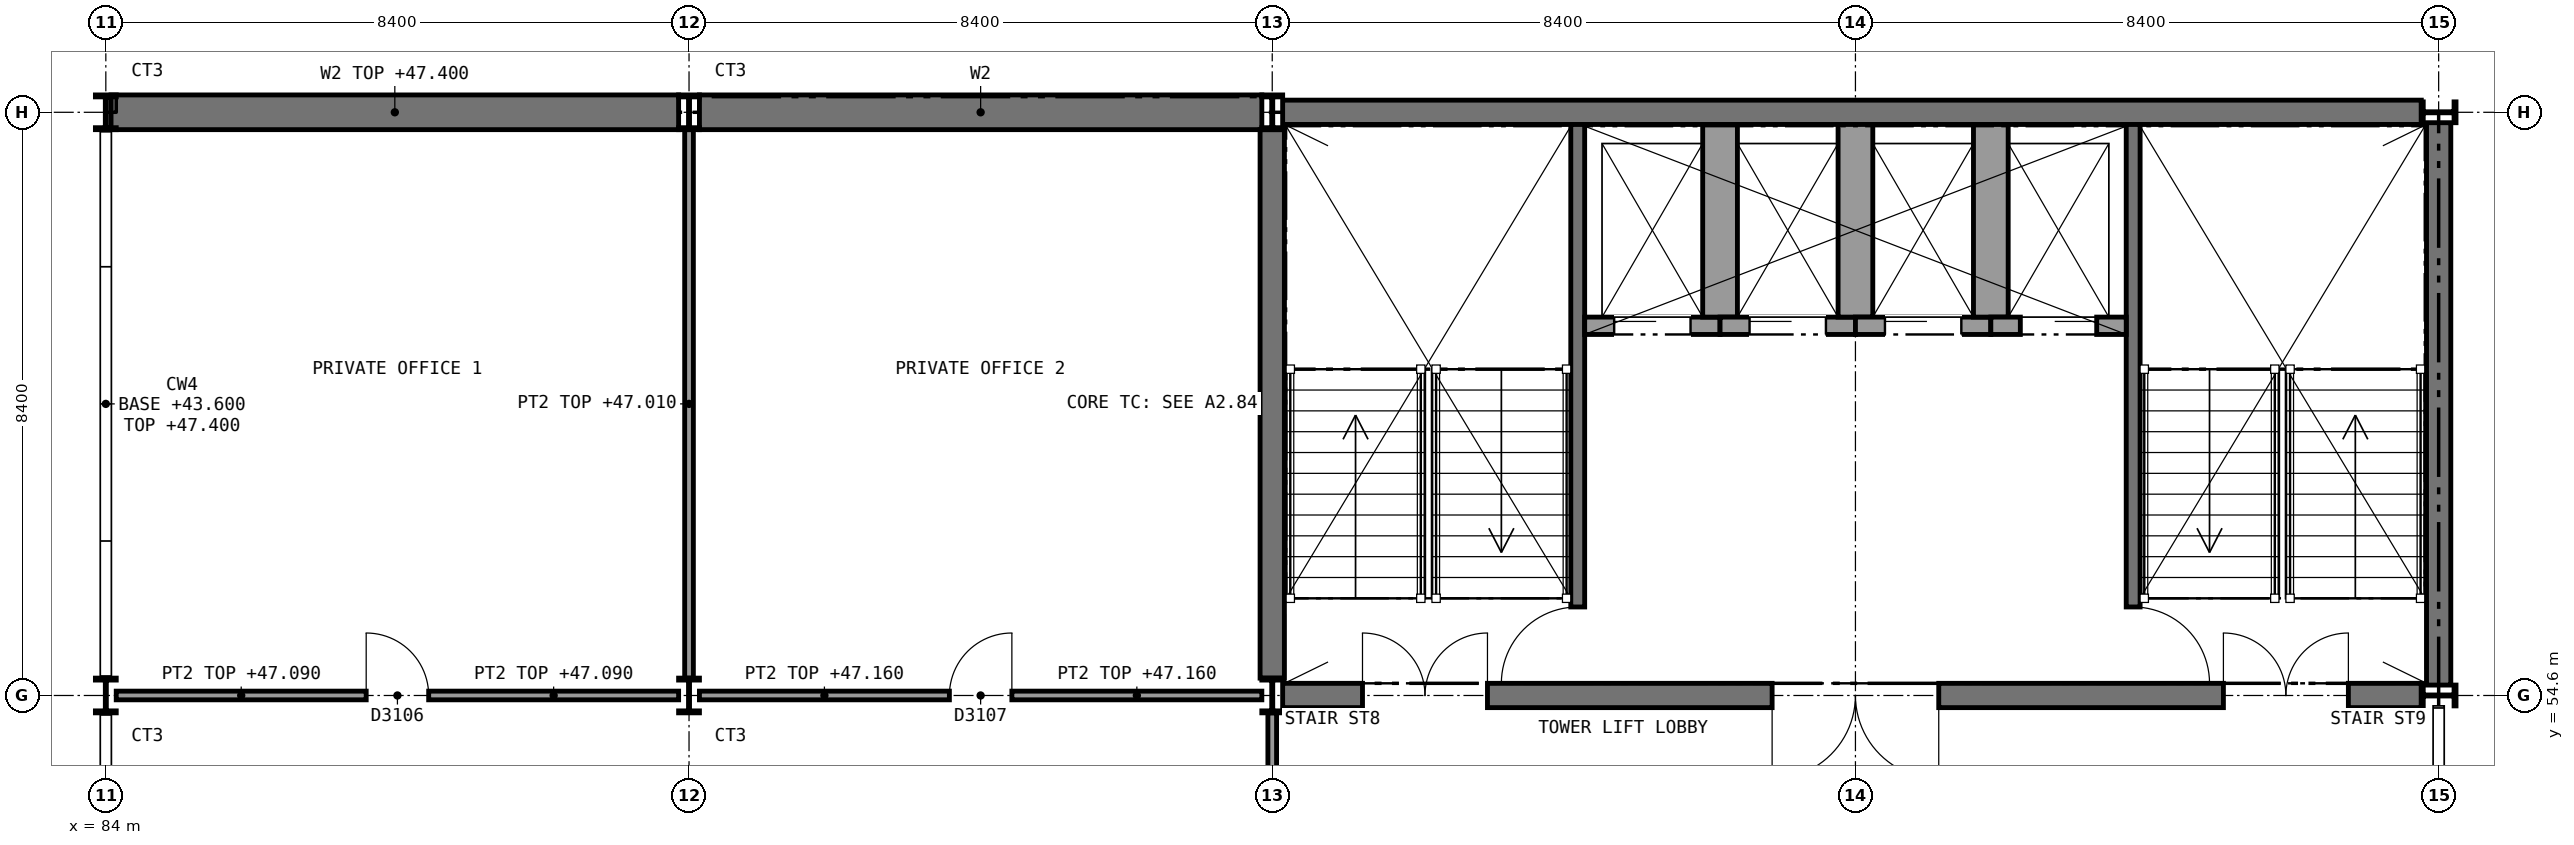
"""IFC4 building model, lengths in metres.
Left out: names, types, materials, properties, quantities, classifications, styles, units other than length and angle.
Written with IfcOpenShell. Run it as: python <this file> out.ifc"""

import sys

from ifc_helpers import new_model, si_unit, direction, frame, frame_2d, origin, origin_2d, place, context, subcontext, project, spatial, rectangle, i_section, extrude, element, fill, save


model = new_model("IFC4")
c1 = context("Model", 3, precision=1e-05, world=origin(), true_north=direction((0.0, 1.0)))
c2 = subcontext(c1, "Body", "Model", "MODEL_VIEW")
j1 = project(units=[si_unit("LENGTHUNIT", "METRE"), si_unit("PLANEANGLEUNIT", "RADIAN")], contexts=[c1])
p1 = place(None, origin())
s1 = spatial("IfcSite", under=j1, at=p1, CompositionType="ELEMENT")
p2 = place(p1, origin())
s2 = spatial("IfcBuilding", under=s1, at=p2, CompositionType="ELEMENT")
p3 = place(p2, frame((0.0, 0.0, 43.6)))
s3 = spatial("IfcBuildingStorey", under=s2, at=p3, CompositionType="ELEMENT", Elevation=43.6)
p4 = place(p3, frame((84.075, 63.0, 0.0), z_axis=(0.0, 0.0, 1.0), x_axis=(1.0, 0.0, 0.0)))
e1 = element("IfcWall", 1, at=p4, inside=s3, PredefinedType="SHEAR", context=c2, shape_type="SweptSolid", body=[
    extrude(rectangle(XDim=8.175, YDim=0.5, at=frame_2d((4.087, 0.0))), origin(), (0.0, 0.0, 1.0), 3.8),
])
p5 = place(p3, frame((92.55, 63.0, 0.0), z_axis=(0.0, 0.0, 1.0), x_axis=(1.0, 0.0, 0.0)))
e2 = element("IfcWall", 2, at=p5, inside=s3, PredefinedType="SHEAR", context=c2, shape_type="SweptSolid", body=[
    extrude(rectangle(XDim=8.1, YDim=0.5, at=frame_2d((4.05, 0.0))), origin(), (0.0, 0.0, 1.0), 3.85),
])
p6 = place(p3, frame((100.95, 63.0, 0.0), z_axis=(0.0, 0.0, 1.0), x_axis=(1.0, 0.0, 0.0)))
e3 = element("IfcWall", 3, at=p6, inside=s3, PredefinedType="SHEAR", context=c2, shape_type="SweptSolid", body=[
    extrude(rectangle(XDim=16.4, YDim=0.35, at=frame_2d((8.2, 0.0))), origin(), (0.0, 0.0, 1.0), 3.85),
])
p7 = place(p3, frame((100.95, 54.6, 0.0), z_axis=(0.0, 0.0, 1.0), x_axis=(1.0, 0.0, 0.0)))
e4 = element("IfcWall", 4, at=p7, inside=s3, PredefinedType="SHEAR", context=c2, shape_type="SweptSolid", body=[
    extrude(rectangle(XDim=16.4, YDim=0.35, at=frame_2d((8.2, 0.0))), origin(), (0.0, 0.0, 1.0), 3.85),
])
p8 = place(p7, frame((1.15, 0.0, 0.0)))
e5 = element("IfcOpeningElement", 5, at=p8, cuts=e4, PredefinedType="OPENING", context=c2, shape_type="SweptSolid", body=[
    extrude(rectangle(XDim=1.8, YDim=2.1, at=frame_2d((0.9, 1.05))), frame((0.0, 0.185, 0.0), z_axis=(0.0, -1.0, 0.0), x_axis=(1.0, 0.0, 0.0)), (0.0, 0.0, 1.0), 0.37),
])
p9 = place(p7, frame((13.55, 0.0, 0.0)))
e6 = element("IfcOpeningElement", 6, at=p9, cuts=e4, PredefinedType="OPENING", context=c2, shape_type="SweptSolid", body=[
    extrude(rectangle(XDim=1.8, YDim=2.1, at=frame_2d((0.9, 1.05))), frame((0.0, 0.185, 0.0), z_axis=(0.0, -1.0, 0.0), x_axis=(1.0, 0.0, 0.0)), (0.0, 0.0, 1.0), 0.37),
])
p10 = place(p7, frame((7.05, 0.0, 0.0)))
e7 = element("IfcOpeningElement", 7, at=p10, cuts=e4, PredefinedType="OPENING", context=c2, shape_type="SweptSolid", body=[
    extrude(rectangle(XDim=2.4, YDim=2.4, at=frame_2d((1.2, 1.2))), frame((0.0, 0.185, 0.0), z_axis=(0.0, -1.0, 0.0), x_axis=(1.0, 0.0, 0.0)), (0.0, 0.0, 1.0), 0.37),
])
p11 = place(p3, frame((100.8, 54.85, 0.0), z_axis=(0.0, 0.0, 1.0), x_axis=(0.0, 1.0, 0.0)))
e8 = element("IfcWall", 8, at=p11, inside=s3, PredefinedType="SHEAR", context=c2, shape_type="SweptSolid", body=[
    extrude(rectangle(XDim=7.9, YDim=0.35, at=frame_2d((3.95, 0.0))), origin(), (0.0, 0.0, 1.0), 3.85),
])
p12 = place(p3, frame((117.6, 54.75, 0.0), z_axis=(0.0, 0.0, 1.0), x_axis=(0.0, 1.0, 0.0)))
e9 = element("IfcWall", 9, at=p12, inside=s3, PredefinedType="SHEAR", context=c2, shape_type="SweptSolid", body=[
    extrude(rectangle(XDim=8.1, YDim=0.35, at=frame_2d((4.05, 0.0))), origin(), (0.0, 0.0, 1.0), 3.85),
])
for number, where, z_axis, x_axis in (
    (10, (84.0, 54.6, 0.0), (0.0, 0.0, 1.0), (1.0, 0.0, 0.0)),
    (11, (84.0, 63.0, 0.0), (0.0, 0.0, 1.0), (1.0, 0.0, 0.0)),
    (12, (92.4, 54.6, 0.0), (0.0, 0.0, 1.0), (1.0, 0.0, 0.0)),
    (13, (92.4, 63.0, 0.0), (0.0, 0.0, 1.0), (1.0, 0.0, 0.0)),
    (14, (100.8, 54.6, 0.0), (0.0, 0.0, 1.0), (1.0, 0.0, 0.0)),
    (15, (100.8, 63.0, 0.0), (0.0, 0.0, 1.0), (1.0, 0.0, 0.0)),
    (16, (117.6, 54.6, 0.0), (0.0, 0.0, 1.0), (0.0, 1.0, 0.0)),
    (17, (117.6, 63.0, 0.0), (0.0, 0.0, 1.0), (0.0, 1.0, 0.0)),
):
    element("IfcColumn", number, at=place(p3, frame(where, z_axis=z_axis, x_axis=x_axis)), inside=s3, PredefinedType="COLUMN", context=c2, shape_type="SweptSolid", body=[
        extrude(i_section(OverallWidth=0.3, OverallDepth=0.5, WebThickness=0.014, FlangeThickness=0.028, FilletRadius=0.027, at=origin_2d()), origin(), (0.0, 0.0, 1.0), 4.0),
    ])
p13 = place(p3, frame((100.8, 51.35, 0.0), z_axis=(0.0, 0.0, 1.0), x_axis=(0.0, 1.0, 0.0)))
e18 = element("IfcWall", 18, at=p13, inside=s3, PredefinedType="PARTITIONING", context=c2, shape_type="SweptSolid", body=[
    extrude(rectangle(XDim=3.0, YDim=0.125, at=frame_2d((1.5, 0.0))), origin(), (0.0, 0.0, 1.0), 3.5),
])
p14 = place(p3, frame((84.15, 54.6, 0.0), z_axis=(0.0, 0.0, 1.0), x_axis=(1.0, 0.0, 0.0)))
e19 = element("IfcWall", 19, at=p14, inside=s3, PredefinedType="PARTITIONING", context=c2, shape_type="SweptSolid", body=[
    extrude(rectangle(XDim=8.1, YDim=0.125, at=frame_2d((4.05, 0.0))), origin(), (0.0, 0.0, 1.0), 3.49),
])
p15 = place(p14, frame((3.6, 0.0, 0.0)))
e20 = element("IfcOpeningElement", 20, at=p15, cuts=e19, PredefinedType="OPENING", context=c2, shape_type="SweptSolid", body=[
    extrude(rectangle(XDim=0.9, YDim=2.1, at=frame_2d((0.45, 1.05))), frame((0.0, 0.073, 0.0), z_axis=(0.0, -1.0, 0.0), x_axis=(1.0, 0.0, 0.0)), (0.0, 0.0, 1.0), 0.145),
])
p16 = place(p3, frame((92.55, 54.6, 0.0), z_axis=(0.0, 0.0, 1.0), x_axis=(1.0, 0.0, 0.0)))
e21 = element("IfcWall", 21, at=p16, inside=s3, PredefinedType="PARTITIONING", context=c2, shape_type="SweptSolid", body=[
    extrude(rectangle(XDim=8.1, YDim=0.125, at=frame_2d((4.05, 0.0))), origin(), (0.0, 0.0, 1.0), 3.56),
])
p17 = place(p16, frame((3.6, 0.0, 0.0)))
e22 = element("IfcOpeningElement", 22, at=p17, cuts=e21, PredefinedType="OPENING", context=c2, shape_type="SweptSolid", body=[
    extrude(rectangle(XDim=0.9, YDim=2.1, at=frame_2d((0.45, 1.05))), frame((0.0, 0.073, 0.0), z_axis=(0.0, -1.0, 0.0), x_axis=(1.0, 0.0, 0.0)), (0.0, 0.0, 1.0), 0.145),
])
p18 = place(p3, frame((92.4, 54.85, 0.0), z_axis=(0.0, 0.0, 1.0), x_axis=(0.0, 1.0, 0.0)))
e23 = element("IfcWall", 23, at=p18, inside=s3, PredefinedType="PARTITIONING", context=c2, shape_type="SweptSolid", body=[
    extrude(rectangle(XDim=7.9, YDim=0.125, at=frame_2d((3.95, 0.0))), origin(), (0.0, 0.0, 1.0), 3.41),
])
p19 = place(p3, frame((105.2, 62.825, 0.0), z_axis=(0.0, 0.0, 1.0), x_axis=(0.0, -1.0, 0.0)))
e24 = element("IfcWall", 24, at=p19, inside=s3, PredefinedType="SHEAR", context=c2, shape_type="SweptSolid", body=[
    extrude(rectangle(XDim=8.05, YDim=0.2, at=frame_2d((4.025, 0.0))), origin(), (0.0, 0.0, 1.0), 3.85),
])
p20 = place(p19, frame((6.95, 0.0, 0.0)))
e25 = element("IfcOpeningElement", 25, at=p20, cuts=e24, PredefinedType="OPENING", context=c2, shape_type="SweptSolid", body=[
    extrude(rectangle(XDim=1.11, YDim=2.1, at=frame_2d((0.555, 1.05))), frame((0.0, 0.11, 0.0), z_axis=(0.0, -1.0, 0.0), x_axis=(1.0, 0.0, 0.0)), (0.0, 0.0, 1.0), 0.22),
])
p21 = place(p3, frame((113.2, 62.825, 0.0), z_axis=(0.0, 0.0, 1.0), x_axis=(0.0, -1.0, 0.0)))
e26 = element("IfcWall", 26, at=p21, inside=s3, PredefinedType="SHEAR", context=c2, shape_type="SweptSolid", body=[
    extrude(rectangle(XDim=8.05, YDim=0.2, at=frame_2d((4.025, 0.0))), origin(), (0.0, 0.0, 1.0), 3.85),
])
p22 = place(p21, frame((6.95, 0.0, 0.0)))
e27 = element("IfcOpeningElement", 27, at=p22, cuts=e26, PredefinedType="OPENING", context=c2, shape_type="SweptSolid", body=[
    extrude(rectangle(XDim=1.11, YDim=2.1, at=frame_2d((0.555, 1.05))), frame((0.0, 0.11, 0.0), z_axis=(0.0, -1.0, 0.0), x_axis=(1.0, 0.0, 0.0)), (0.0, 0.0, 1.0), 0.22),
])
p23 = place(p3, frame((105.3, 59.925, 0.0), z_axis=(0.0, 0.0, 1.0), x_axis=(1.0, 0.0, 0.0)))
e28 = element("IfcWall", 28, at=p23, inside=s3, PredefinedType="SOLIDWALL", context=c2, shape_type="SweptSolid", body=[
    extrude(rectangle(XDim=1.95, YDim=0.25, at=frame_2d((0.975, 0.0))), origin(), (0.0, 0.0, 1.0), 4.0),
])
p24 = place(p23, frame((0.425, 0.0, 0.0)))
e29 = element("IfcOpeningElement", 29, at=p24, cuts=e28, PredefinedType="OPENING", context=c2, shape_type="SweptSolid", body=[
    extrude(rectangle(XDim=1.1, YDim=2.1, at=frame_2d((0.55, 1.05))), frame((0.0, 0.135, 0.0), z_axis=(0.0, -1.0, 0.0), x_axis=(1.0, 0.0, 0.0)), (0.0, 0.0, 1.0), 0.27),
])
p25 = place(p3, frame((107.25, 62.825, 0.0), z_axis=(0.0, 0.0, 1.0), x_axis=(0.0, -1.0, 0.0)))
e30 = element("IfcWall", 30, at=p25, inside=s3, PredefinedType="SOLIDWALL", context=c2, shape_type="SweptSolid", body=[
    extrude(rectangle(XDim=2.775, YDim=0.5, at=frame_2d((1.387, 0.0))), origin(), (0.0, 0.0, 1.0), 4.0),
])
p26 = place(p3, frame((107.25, 59.925, 0.0), z_axis=(0.0, 0.0, 1.0), x_axis=(1.0, 0.0, 0.0)))
e31 = element("IfcWall", 31, at=p26, inside=s3, PredefinedType="SOLIDWALL", context=c2, shape_type="SweptSolid", body=[
    extrude(rectangle(XDim=1.95, YDim=0.25, at=frame_2d((0.975, 0.0))), origin(), (0.0, 0.0, 1.0), 4.0),
])
p27 = place(p26, frame((0.425, 0.0, 0.0)))
e32 = element("IfcOpeningElement", 32, at=p27, cuts=e31, PredefinedType="OPENING", context=c2, shape_type="SweptSolid", body=[
    extrude(rectangle(XDim=1.1, YDim=2.1, at=frame_2d((0.55, 1.05))), frame((0.0, 0.135, 0.0), z_axis=(0.0, -1.0, 0.0), x_axis=(1.0, 0.0, 0.0)), (0.0, 0.0, 1.0), 0.27),
])
p28 = place(p3, frame((109.2, 62.825, 0.0), z_axis=(0.0, 0.0, 1.0), x_axis=(0.0, -1.0, 0.0)))
e33 = element("IfcWall", 33, at=p28, inside=s3, PredefinedType="SOLIDWALL", context=c2, shape_type="SweptSolid", body=[
    extrude(rectangle(XDim=2.775, YDim=0.5, at=frame_2d((1.387, 0.0))), origin(), (0.0, 0.0, 1.0), 4.0),
])
p29 = place(p3, frame((109.2, 59.925, 0.0), z_axis=(0.0, 0.0, 1.0), x_axis=(1.0, 0.0, 0.0)))
e34 = element("IfcWall", 34, at=p29, inside=s3, PredefinedType="SOLIDWALL", context=c2, shape_type="SweptSolid", body=[
    extrude(rectangle(XDim=1.95, YDim=0.25, at=frame_2d((0.975, 0.0))), origin(), (0.0, 0.0, 1.0), 4.0),
])
p30 = place(p29, frame((0.425, 0.0, 0.0)))
e35 = element("IfcOpeningElement", 35, at=p30, cuts=e34, PredefinedType="OPENING", context=c2, shape_type="SweptSolid", body=[
    extrude(rectangle(XDim=1.1, YDim=2.1, at=frame_2d((0.55, 1.05))), frame((0.0, 0.135, 0.0), z_axis=(0.0, -1.0, 0.0), x_axis=(1.0, 0.0, 0.0)), (0.0, 0.0, 1.0), 0.27),
])
p31 = place(p3, frame((111.15, 62.825, 0.0), z_axis=(0.0, 0.0, 1.0), x_axis=(0.0, -1.0, 0.0)))
e36 = element("IfcWall", 36, at=p31, inside=s3, PredefinedType="SOLIDWALL", context=c2, shape_type="SweptSolid", body=[
    extrude(rectangle(XDim=2.775, YDim=0.5, at=frame_2d((1.387, 0.0))), origin(), (0.0, 0.0, 1.0), 4.0),
])
p32 = place(p3, frame((111.15, 59.925, 0.0), z_axis=(0.0, 0.0, 1.0), x_axis=(1.0, 0.0, 0.0)))
e37 = element("IfcWall", 37, at=p32, inside=s3, PredefinedType="SOLIDWALL", context=c2, shape_type="SweptSolid", body=[
    extrude(rectangle(XDim=1.95, YDim=0.25, at=frame_2d((0.975, 0.0))), origin(), (0.0, 0.0, 1.0), 4.0),
])
p33 = place(p32, frame((0.425, 0.0, 0.0)))
e38 = element("IfcOpeningElement", 38, at=p33, cuts=e37, PredefinedType="OPENING", context=c2, shape_type="SweptSolid", body=[
    extrude(rectangle(XDim=1.1, YDim=2.1, at=frame_2d((0.55, 1.05))), frame((0.0, 0.135, 0.0), z_axis=(0.0, -1.0, 0.0), x_axis=(1.0, 0.0, 0.0)), (0.0, 0.0, 1.0), 0.27),
])
p34 = place(p15, origin())
e39 = element("IfcDoor", 39, at=p34, inside=s3, OperationType="SINGLE_SWING_LEFT", PredefinedType="DOOR", context=c2, shape_type="SweptSolid", body=[
    extrude(rectangle(XDim=0.9, YDim=2.1, at=frame_2d((0.45, 1.05))), frame((0.0, 0.025, 0.0), z_axis=(0.0, -1.0, 0.0), x_axis=(1.0, 0.0, 0.0)), (0.0, 0.0, 1.0), 0.05),
])
fill(e20, e39)
p35 = place(p17, origin())
e40 = element("IfcDoor", 40, at=p35, inside=s3, OperationType="SINGLE_SWING_RIGHT", PredefinedType="DOOR", context=c2, shape_type="SweptSolid", body=[
    extrude(rectangle(XDim=0.9, YDim=2.1, at=frame_2d((0.45, 1.05))), frame((0.0, 0.025, 0.0), z_axis=(0.0, -1.0, 0.0), x_axis=(1.0, 0.0, 0.0)), (0.0, 0.0, 1.0), 0.05),
])
fill(e22, e40)
p36 = place(p20, frame((1.1, 0.0, 0.0), z_axis=(0.0, 0.0, 1.0), x_axis=(-1.0, 0.0, 0.0)))
e41 = element("IfcDoor", 41, at=p36, inside=s3, OperationType="SINGLE_SWING_LEFT", PredefinedType="DOOR", context=c2, shape_type="SweptSolid", body=[
    extrude(rectangle(XDim=1.1, YDim=2.1, at=frame_2d((0.55, 1.05))), frame((0.0, 0.025, 0.0), z_axis=(0.0, -1.0, 0.0), x_axis=(1.0, 0.0, 0.0)), (0.0, 0.0, 1.0), 0.05),
])
fill(e25, e41)
p37 = place(p22, origin())
e42 = element("IfcDoor", 42, at=p37, inside=s3, OperationType="SINGLE_SWING_RIGHT", PredefinedType="DOOR", context=c2, shape_type="SweptSolid", body=[
    extrude(rectangle(XDim=1.1, YDim=2.1, at=frame_2d((0.55, 1.05))), frame((0.0, 0.025, 0.0), z_axis=(0.0, -1.0, 0.0), x_axis=(1.0, 0.0, 0.0)), (0.0, 0.0, 1.0), 0.05),
])
fill(e27, e42)
p38 = place(p24, frame((1.1, 0.0, 0.0), z_axis=(0.0, 0.0, 1.0), x_axis=(-1.0, 0.0, 0.0)))
e43 = element("IfcDoor", 43, at=p38, inside=s3, OperationType="SLIDING_TO_RIGHT", PredefinedType="DOOR", context=c2, shape_type="SweptSolid", body=[
    extrude(rectangle(XDim=1.1, YDim=2.1, at=frame_2d((0.55, 1.05))), frame((0.0, 0.025, 0.0), z_axis=(0.0, -1.0, 0.0), x_axis=(1.0, 0.0, 0.0)), (0.0, 0.0, 1.0), 0.05),
])
fill(e29, e43)
p39 = place(p27, frame((1.1, 0.0, 0.0), z_axis=(0.0, 0.0, 1.0), x_axis=(-1.0, 0.0, 0.0)))
e44 = element("IfcDoor", 44, at=p39, inside=s3, OperationType="SLIDING_TO_RIGHT", PredefinedType="DOOR", context=c2, shape_type="SweptSolid", body=[
    extrude(rectangle(XDim=1.1, YDim=2.1, at=frame_2d((0.55, 1.05))), frame((0.0, 0.025, 0.0), z_axis=(0.0, -1.0, 0.0), x_axis=(1.0, 0.0, 0.0)), (0.0, 0.0, 1.0), 0.05),
])
fill(e32, e44)
p40 = place(p30, frame((1.1, 0.0, 0.0), z_axis=(0.0, 0.0, 1.0), x_axis=(-1.0, 0.0, 0.0)))
e45 = element("IfcDoor", 45, at=p40, inside=s3, OperationType="SLIDING_TO_RIGHT", PredefinedType="DOOR", context=c2, shape_type="SweptSolid", body=[
    extrude(rectangle(XDim=1.1, YDim=2.1, at=frame_2d((0.55, 1.05))), frame((0.0, 0.025, 0.0), z_axis=(0.0, -1.0, 0.0), x_axis=(1.0, 0.0, 0.0)), (0.0, 0.0, 1.0), 0.05),
])
fill(e35, e45)
p41 = place(p33, frame((1.1, 0.0, 0.0), z_axis=(0.0, 0.0, 1.0), x_axis=(-1.0, 0.0, 0.0)))
e46 = element("IfcDoor", 46, at=p41, inside=s3, OperationType="SLIDING_TO_LEFT", PredefinedType="DOOR", context=c2, shape_type="SweptSolid", body=[
    extrude(rectangle(XDim=1.1, YDim=2.1, at=frame_2d((0.55, 1.05))), frame((0.0, 0.025, 0.0), z_axis=(0.0, -1.0, 0.0), x_axis=(1.0, 0.0, 0.0)), (0.0, 0.0, 1.0), 0.05),
])
fill(e38, e46)
p42 = place(p8, origin())
e47 = element("IfcDoor", 47, at=p42, inside=s3, OperationType="DOUBLE_DOOR_SINGLE_SWING", PredefinedType="DOOR", context=c2, shape_type="SweptSolid", body=[
    extrude(rectangle(XDim=1.8, YDim=2.1, at=frame_2d((0.9, 1.05))), frame((0.0, 0.025, 0.0), z_axis=(0.0, -1.0, 0.0), x_axis=(1.0, 0.0, 0.0)), (0.0, 0.0, 1.0), 0.05),
])
fill(e5, e47)
p43 = place(p9, origin())
e48 = element("IfcDoor", 48, at=p43, inside=s3, OperationType="DOUBLE_DOOR_SINGLE_SWING", PredefinedType="DOOR", context=c2, shape_type="SweptSolid", body=[
    extrude(rectangle(XDim=1.8, YDim=2.1, at=frame_2d((0.9, 1.05))), frame((0.0, 0.025, 0.0), z_axis=(0.0, -1.0, 0.0), x_axis=(1.0, 0.0, 0.0)), (0.0, 0.0, 1.0), 0.05),
])
fill(e6, e48)
p44 = place(p10, frame((2.4, 0.0, 0.0), z_axis=(0.0, 0.0, 1.0), x_axis=(-1.0, 0.0, 0.0)))
e49 = element("IfcDoor", 49, at=p44, inside=s3, OperationType="DOUBLE_DOOR_SINGLE_SWING", PredefinedType="DOOR", context=c2, shape_type="SweptSolid", body=[
    extrude(rectangle(XDim=2.4, YDim=2.4, at=frame_2d((1.2, 1.2))), frame((0.0, 0.025, 0.0), z_axis=(0.0, -1.0, 0.0), x_axis=(1.0, 0.0, 0.0)), (0.0, 0.0, 1.0), 0.05),
])
fill(e7, e49)
save(model, sys.argv[1])
